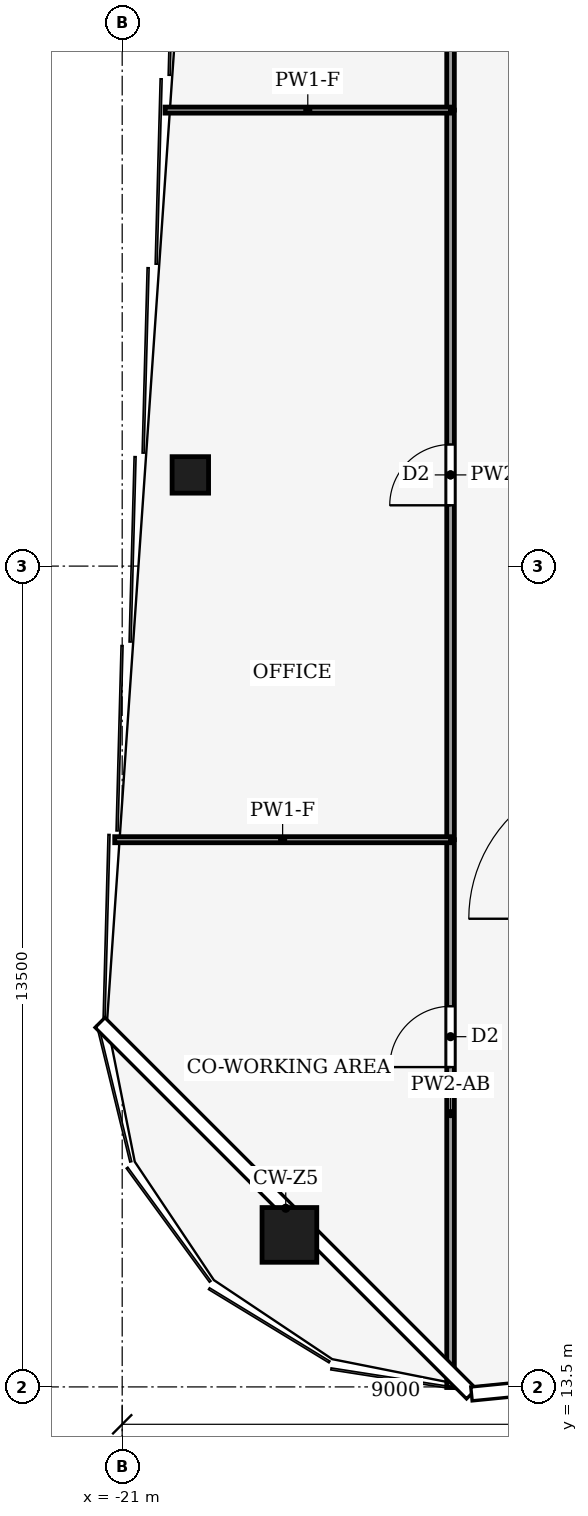
"""IFC4 building model, lengths in metres.
Left out: names, types, materials, properties, quantities, classifications, styles, units other than length and angle.
Written with IfcOpenShell. Run it as: python <this file> out.ifc"""

import sys

from ifc_helpers import new_model, si_unit, direction, frame, frame_2d, origin, origin_2d, place, context, subcontext, project, spatial, rectangle, hollow_rectangle, extrude, element, fill, save


model = new_model("IFC4")
c1 = context("Model", 3, precision=1e-05, world=origin(), true_north=direction((0.0, 1.0)))
c2 = subcontext(c1, "Body", "Model", "MODEL_VIEW")
j1 = project(units=[si_unit("LENGTHUNIT", "METRE"), si_unit("PLANEANGLEUNIT", "RADIAN")], contexts=[c1])
p1 = place(None, origin())
s1 = spatial("IfcSite", under=j1, at=p1, CompositionType="ELEMENT")
p2 = place(p1, origin())
s2 = spatial("IfcBuilding", under=s1, at=p2, CompositionType="ELEMENT")
p3 = place(p2, frame((0.0, 0.0, 298.0)))
s3 = spatial("IfcBuildingStorey", under=s2, at=p3, CompositionType="ELEMENT", Elevation=298.0)
p4 = place(p3, frame((-18.25, 16.0, 0.0), z_axis=(0.0, 0.0, 1.0), x_axis=(1.0, 0.0, 0.0)))
e1 = element("IfcColumn", 1, at=p4, inside=s3, PredefinedType="COLUMN", context=c2, shape_type="SweptSolid", body=[
    extrude(hollow_rectangle(XDim=0.9, YDim=0.9, WallThickness=0.04, at=origin_2d()), origin(), (0.0, 0.0, 1.0), 4.0),
])
p5 = place(p3, frame((-19.879, 28.5, 0.0), z_axis=(0.0, 0.0, 1.0), x_axis=(1.0, 0.0, 0.0)))
e2 = element("IfcColumn", 2, at=p5, inside=s3, PredefinedType="COLUMN", context=c2, shape_type="SweptSolid", body=[
    extrude(hollow_rectangle(XDim=0.6, YDim=0.6, WallThickness=0.025, at=origin_2d()), origin(), (0.0, 0.0, 1.0), 4.0),
])
p6 = place(p3, frame((-15.6, 13.49, 0.0), z_axis=(0.0, 0.0, 1.0), x_axis=(0.0, 1.0, 0.0)))
e3 = element("IfcWall", 3, at=p6, inside=s3, PredefinedType="PARTITIONING", context=c2, shape_type="SweptSolid", body=[
    extrude(rectangle(XDim=9.01, YDim=0.125, at=frame_2d((4.505, 0.0))), origin(), (0.0, 0.0, 1.0), 2.93),
])
p7 = place(p6, frame((5.271, 0.0, 0.0)))
e4 = element("IfcOpeningElement", 4, at=p7, cuts=e3, PredefinedType="OPENING", context=c2, shape_type="SweptSolid", body=[
    extrude(rectangle(XDim=1.0, YDim=2.1, at=frame_2d((0.5, 1.05))), frame((0.0, 0.073, 0.0), z_axis=(0.0, -1.0, 0.0), x_axis=(1.0, 0.0, 0.0)), (0.0, 0.0, 1.0), 0.145),
])
p8 = place(p3, frame((-15.6, 22.5, 0.0), z_axis=(0.0, 0.0, 1.0), x_axis=(0.0, 1.0, 0.0)))
e5 = element("IfcWall", 5, at=p8, inside=s3, PredefinedType="PARTITIONING", context=c2, shape_type="SweptSolid", body=[
    extrude(rectangle(XDim=12.0, YDim=0.125, at=frame_2d((6.0, 0.0))), origin(), (0.0, 0.0, 1.0), 3.54),
])
p9 = place(p8, frame((5.5, 0.0, 0.0)))
e6 = element("IfcOpeningElement", 6, at=p9, cuts=e5, PredefinedType="OPENING", context=c2, shape_type="SweptSolid", body=[
    extrude(rectangle(XDim=1.0, YDim=2.1, at=frame_2d((0.5, 1.05))), frame((0.0, 0.073, 0.0), z_axis=(0.0, -1.0, 0.0), x_axis=(1.0, 0.0, 0.0)), (0.0, 0.0, 1.0), 0.145),
])
p10 = place(p3, frame((-15.6, 34.5, 0.0), z_axis=(0.0, 0.0, 1.0), x_axis=(0.0, 1.0, 0.0)))
e7 = element("IfcWall", 7, at=p10, inside=s3, PredefinedType="PARTITIONING", context=c2, shape_type="SweptSolid", body=[
    extrude(rectangle(XDim=6.104, YDim=0.125, at=frame_2d((3.052, 0.0))), origin(), (0.0, 0.0, 1.0), 3.14),
])
p11 = place(p10, frame((2.552, 0.0, 0.0)))
e8 = element("IfcOpeningElement", 8, at=p11, cuts=e7, PredefinedType="OPENING", context=c2, shape_type="SweptSolid", body=[
    extrude(rectangle(XDim=1.0, YDim=2.1, at=frame_2d((0.5, 1.05))), frame((0.0, 0.073, 0.0), z_axis=(0.0, -1.0, 0.0), x_axis=(1.0, 0.0, 0.0)), (0.0, 0.0, 1.0), 0.145),
])
p12 = place(p3, frame((-15.6, 22.5, 0.0), z_axis=(0.0, 0.0, 1.0), x_axis=(-1.0, 0.0, 0.0)))
e9 = element("IfcWall", 9, at=p12, inside=s3, PredefinedType="PARTITIONING", context=c2, shape_type="SweptSolid", body=[
    extrude(rectangle(XDim=5.523, YDim=0.1, at=frame_2d((2.761, 0.0))), origin(), (0.0, 0.0, 1.0), 3.04),
])
p13 = place(p3, frame((-15.6, 34.5, 0.0), z_axis=(0.0, 0.0, 1.0), x_axis=(-1.0, 0.0, 0.0)))
e10 = element("IfcWall", 10, at=p13, inside=s3, PredefinedType="PARTITIONING", context=c2, shape_type="SweptSolid", body=[
    extrude(rectangle(XDim=4.695, YDim=0.1, at=frame_2d((2.348, 0.0))), origin(), (0.0, 0.0, 1.0), 3.04),
])
p14 = place(p7, origin())
e11 = element("IfcDoor", 11, at=p14, inside=s3, OperationType="SINGLE_SWING_RIGHT", PredefinedType="DOOR", context=c2, shape_type="SweptSolid", body=[
    extrude(rectangle(XDim=1.0, YDim=2.1, at=frame_2d((0.5, 1.05))), frame((0.0, 0.025, 0.0), z_axis=(0.0, -1.0, 0.0), x_axis=(1.0, 0.0, 0.0)), (0.0, 0.0, 1.0), 0.05),
])
fill(e4, e11)
p15 = place(p9, origin())
e12 = element("IfcDoor", 12, at=p15, inside=s3, OperationType="SINGLE_SWING_RIGHT", PredefinedType="DOOR", context=c2, shape_type="SweptSolid", body=[
    extrude(rectangle(XDim=1.0, YDim=2.1, at=frame_2d((0.5, 1.05))), frame((0.0, 0.025, 0.0), z_axis=(0.0, -1.0, 0.0), x_axis=(1.0, 0.0, 0.0)), (0.0, 0.0, 1.0), 0.05),
])
fill(e6, e12)
save(model, sys.argv[1])
